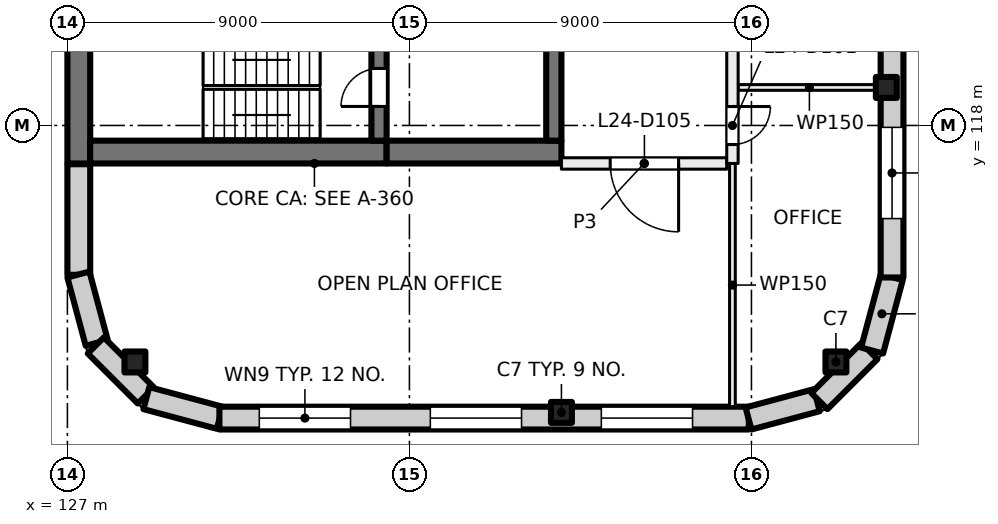
"""IFC4 building model, lengths in metres.
Left out: names, types, materials, properties, quantities, classifications, styles, units other than length and angle.
Written with IfcOpenShell. Run it as: python <this file> out.ifc"""

import sys

from ifc_helpers import new_model, si_unit, direction, frame, frame_2d, origin, origin_2d, place, context, subcontext, project, spatial, rectangle, extrude, element, fill, save


model = new_model("IFC4")
c1 = context("Model", 3, precision=1e-05, world=origin(), true_north=direction((0.0, 1.0)))
c2 = subcontext(c1, "Body", "Model", "MODEL_VIEW")
j1 = project(units=[si_unit("LENGTHUNIT", "METRE"), si_unit("PLANEANGLEUNIT", "RADIAN")], contexts=[c1])
p1 = place(None, origin())
s1 = spatial("IfcSite", under=j1, at=p1, CompositionType="ELEMENT")
p2 = place(p1, origin())
s2 = spatial("IfcBuilding", under=s1, at=p2, CompositionType="ELEMENT")
p3 = place(p2, frame((0.0, 0.0, 105.0)))
s3 = spatial("IfcBuildingStorey", under=s2, at=p3, CompositionType="ELEMENT", Elevation=105.0)
for number, where, z_axis, x_axis in (
    (1, (128.777, 111.777, 0.0), (0.0, 0.0, 1.0), (1.0, 0.0, 0.0)),
    (2, (148.55, 119.0, 0.0), (0.0, 0.0, 1.0), (1.0, 0.0, 0.0)),
    (3, (140.0, 110.45, 0.0), (0.0, 0.0, 1.0), (1.0, 0.0, 0.0)),
    (4, (147.223, 111.777, 0.0), (0.0, 0.0, 1.0), (1.0, 0.0, 0.0)),
):
    element("IfcColumn", number, at=place(p3, frame(where, z_axis=z_axis, x_axis=x_axis)), inside=s3, PredefinedType="COLUMN", context=c2, shape_type="SweptSolid", body=[
        extrude(rectangle(XDim=0.55, YDim=0.55, at=origin_2d()), origin(), (0.0, 0.0, 1.0), 4.0),
    ])
p4 = place(p3, frame((127.3, 117.0, 0.0), z_axis=(0.0, 0.0, 1.0), x_axis=(0.0, 1.0, 0.0)))
e5 = element("IfcWall", 5, at=p4, inside=s3, PredefinedType="SHEAR", context=c2, shape_type="SweptSolid", body=[
    extrude(rectangle(XDim=3.8, YDim=0.6, at=frame_2d((1.9, 0.0))), origin(), (0.0, 0.0, 1.0), 4.0),
])
p5 = place(p3, frame((127.6, 117.3, 0.0), z_axis=(0.0, 0.0, 1.0), x_axis=(1.0, 0.0, 0.0)))
e6 = element("IfcWall", 6, at=p5, inside=s3, PredefinedType="SHEAR", context=c2, shape_type="SweptSolid", body=[
    extrude(rectangle(XDim=7.8, YDim=0.6, at=frame_2d((3.9, 0.0))), origin(), (0.0, 0.0, 1.0), 4.0),
])
p6 = place(p3, frame((135.4, 117.3, 0.0), z_axis=(0.0, 0.0, 1.0), x_axis=(1.0, 0.0, 0.0)))
e7 = element("IfcWall", 7, at=p6, inside=s3, PredefinedType="SHEAR", context=c2, shape_type="SweptSolid", body=[
    extrude(rectangle(XDim=4.6, YDim=0.6, at=frame_2d((2.3, 0.0))), origin(), (0.0, 0.0, 1.0), 4.0),
])
p7 = place(p3, frame((135.2, 117.6, 0.0), z_axis=(0.0, 0.0, 1.0), x_axis=(0.0, 1.0, 0.0)))
e8 = element("IfcWall", 8, at=p7, inside=s3, PredefinedType="SHEAR", context=c2, shape_type="SweptSolid", body=[
    extrude(rectangle(XDim=2.8, YDim=0.4, at=frame_2d((1.4, 0.0))), origin(), (0.0, 0.0, 1.0), 4.0),
])
p8 = place(p7, frame((0.9, 0.0, 0.0)))
e9 = element("IfcOpeningElement", 9, at=p8, cuts=e8, PredefinedType="OPENING", context=c2, shape_type="SweptSolid", body=[
    extrude(rectangle(XDim=1.0, YDim=2.1, at=frame_2d((0.5, 1.05))), frame((0.0, 0.21, 0.0), z_axis=(0.0, -1.0, 0.0), x_axis=(1.0, 0.0, 0.0)), (0.0, 0.0, 1.0), 0.42),
])
p9 = place(p3, frame((139.8, 117.6, 0.0), z_axis=(0.0, 0.0, 1.0), x_axis=(0.0, 1.0, 0.0)))
e10 = element("IfcWall", 10, at=p9, inside=s3, PredefinedType="SHEAR", context=c2, shape_type="SweptSolid", body=[
    extrude(rectangle(XDim=8.6, YDim=0.4, at=frame_2d((4.3, 0.0))), origin(), (0.0, 0.0, 1.0), 4.0),
])
p10 = place(p3, frame((127.3, 114.07, 0.0), z_axis=(0.0, 0.0, 1.0), x_axis=(0.0, 1.0, 0.0)))
e11 = element("IfcWall", 11, at=p10, inside=s3, PredefinedType="SOLIDWALL", context=c2, shape_type="SweptSolid", body=[
    extrude(rectangle(XDim=2.91, YDim=0.6, at=frame_2d((1.455, 0.0))), origin(), (0.0, 0.0, 1.0), 3.625),
])
for number, where, z_axis, x_axis in (
    (12, (127.771, 112.281, 0.0), (0.0, 0.0, 1.0), (-0.259, 0.966, 0.0)),
    (13, (129.064, 110.896, 0.0), (0.0, 0.0, 1.0), (-0.707, 0.707, 0.0)),
):
    element("IfcWall", number, at=place(p3, frame(where, z_axis=z_axis, x_axis=x_axis)), inside=s3, PredefinedType="SOLIDWALL", context=c2, shape_type="SweptSolid", body=[
        extrude(rectangle(XDim=1.861, YDim=0.6, at=frame_2d((0.93, 0.0))), origin(), (0.0, 0.0, 1.0), 3.625),
    ])
p11 = place(p3, frame((131.01, 110.308, 0.0), z_axis=(0.0, 0.0, 1.0), x_axis=(-0.965920269068, 0.258839784042, 0.0)))
e14 = element("IfcWall", 14, at=p11, inside=s3, PredefinedType="SOLIDWALL", context=c2, shape_type="SweptSolid", body=[
    extrude(rectangle(XDim=2.0, YDim=0.6, at=frame_2d((1.0, 0.0))), origin(), (0.0, 0.0, 1.0), 3.625),
])
p12 = place(p3, frame((144.93, 110.3, 0.0), z_axis=(0.0, 0.0, 1.0), x_axis=(-1.0, 0.0, 0.0)))
e15 = element("IfcWall", 15, at=p12, inside=s3, PredefinedType="SOLIDWALL", context=c2, shape_type="SweptSolid", body=[
    extrude(rectangle(XDim=13.93, YDim=0.6, at=frame_2d((6.965, 0.0))), origin(), (0.0, 0.0, 1.0), 3.625),
])
p13 = place(p12, frame((1.48, 0.0, 0.9)))
e16 = element("IfcOpeningElement", 16, at=p13, cuts=e15, PredefinedType="OPENING", context=c2, shape_type="SweptSolid", body=[
    extrude(rectangle(XDim=2.4, YDim=2.4, at=frame_2d((1.2, 1.2))), frame((0.0, 0.31, 0.0), z_axis=(0.0, -1.0, 0.0), x_axis=(1.0, 0.0, 0.0)), (0.0, 0.0, 1.0), 0.62),
])
p14 = place(p12, frame((5.98, 0.0, 0.9)))
e17 = element("IfcOpeningElement", 17, at=p14, cuts=e15, PredefinedType="OPENING", context=c2, shape_type="SweptSolid", body=[
    extrude(rectangle(XDim=2.4, YDim=2.4, at=frame_2d((1.2, 1.2))), frame((0.0, 0.31, 0.0), z_axis=(0.0, -1.0, 0.0), x_axis=(1.0, 0.0, 0.0)), (0.0, 0.0, 1.0), 0.62),
])
p15 = place(p12, frame((10.48, 0.0, 0.9)))
e18 = element("IfcOpeningElement", 18, at=p15, cuts=e15, PredefinedType="OPENING", context=c2, shape_type="SweptSolid", body=[
    extrude(rectangle(XDim=2.4, YDim=2.4, at=frame_2d((1.2, 1.2))), frame((0.0, 0.31, 0.0), z_axis=(0.0, -1.0, 0.0), x_axis=(1.0, 0.0, 0.0)), (0.0, 0.0, 1.0), 0.62),
])
for number, where, z_axis, x_axis in (
    (19, (146.719, 110.771, 0.0), (0.0, 0.0, 1.0), (-0.966, -0.259, 0.0)),
    (20, (148.104, 112.064, 0.0), (0.0, 0.0, 1.0), (-0.707, -0.707, 0.0)),
):
    element("IfcWall", number, at=place(p3, frame(where, z_axis=z_axis, x_axis=x_axis)), inside=s3, PredefinedType="SOLIDWALL", context=c2, shape_type="SweptSolid", body=[
        extrude(rectangle(XDim=1.861, YDim=0.6, at=frame_2d((0.93, 0.0))), origin(), (0.0, 0.0, 1.0), 3.625),
    ])
p16 = place(p3, frame((148.692, 114.01, 0.0), z_axis=(0.0, 0.0, 1.0), x_axis=(-0.258839784042, -0.965920269068, 0.0)))
e21 = element("IfcWall", 21, at=p16, inside=s3, PredefinedType="SOLIDWALL", context=c2, shape_type="SweptSolid", body=[
    extrude(rectangle(XDim=2.0, YDim=0.6, at=frame_2d((1.0, 0.0))), origin(), (0.0, 0.0, 1.0), 3.625),
])
p17 = place(p3, frame((148.7, 141.93, 0.0), z_axis=(0.0, 0.0, 1.0), x_axis=(0.0, -1.0, 0.0)))
e22 = element("IfcWall", 22, at=p17, inside=s3, PredefinedType="SOLIDWALL", context=c2, shape_type="SweptSolid", body=[
    extrude(rectangle(XDim=27.93, YDim=0.6, at=frame_2d((13.965, 0.0))), origin(), (0.0, 0.0, 1.0), 3.625),
])
p18 = place(p17, frame((1.48, 0.0, 0.9)))
e23 = element("IfcOpeningElement", 23, at=p18, cuts=e22, PredefinedType="OPENING", context=c2, shape_type="SweptSolid", body=[
    extrude(rectangle(XDim=2.4, YDim=2.4, at=frame_2d((1.2, 1.2))), frame((0.0, 0.31, 0.0), z_axis=(0.0, -1.0, 0.0), x_axis=(1.0, 0.0, 0.0)), (0.0, 0.0, 1.0), 0.62),
])
p19 = place(p17, frame((5.98, 0.0, 0.9)))
e24 = element("IfcOpeningElement", 24, at=p19, cuts=e22, PredefinedType="OPENING", context=c2, shape_type="SweptSolid", body=[
    extrude(rectangle(XDim=2.4, YDim=2.4, at=frame_2d((1.2, 1.2))), frame((0.0, 0.31, 0.0), z_axis=(0.0, -1.0, 0.0), x_axis=(1.0, 0.0, 0.0)), (0.0, 0.0, 1.0), 0.62),
])
p20 = place(p17, frame((10.48, 0.0, 0.9)))
e25 = element("IfcOpeningElement", 25, at=p20, cuts=e22, PredefinedType="OPENING", context=c2, shape_type="SweptSolid", body=[
    extrude(rectangle(XDim=2.4, YDim=2.4, at=frame_2d((1.2, 1.2))), frame((0.0, 0.31, 0.0), z_axis=(0.0, -1.0, 0.0), x_axis=(1.0, 0.0, 0.0)), (0.0, 0.0, 1.0), 0.62),
])
p21 = place(p17, frame((14.98, 0.0, 0.9)))
e26 = element("IfcOpeningElement", 26, at=p21, cuts=e22, PredefinedType="OPENING", context=c2, shape_type="SweptSolid", body=[
    extrude(rectangle(XDim=2.4, YDim=2.4, at=frame_2d((1.2, 1.2))), frame((0.0, 0.31, 0.0), z_axis=(0.0, -1.0, 0.0), x_axis=(1.0, 0.0, 0.0)), (0.0, 0.0, 1.0), 0.62),
])
p22 = place(p17, frame((19.48, 0.0, 0.9)))
e27 = element("IfcOpeningElement", 27, at=p22, cuts=e22, PredefinedType="OPENING", context=c2, shape_type="SweptSolid", body=[
    extrude(rectangle(XDim=2.4, YDim=2.4, at=frame_2d((1.2, 1.2))), frame((0.0, 0.31, 0.0), z_axis=(0.0, -1.0, 0.0), x_axis=(1.0, 0.0, 0.0)), (0.0, 0.0, 1.0), 0.62),
])
p23 = place(p17, frame((23.98, 0.0, 0.9)))
e28 = element("IfcOpeningElement", 28, at=p23, cuts=e22, PredefinedType="OPENING", context=c2, shape_type="SweptSolid", body=[
    extrude(rectangle(XDim=2.4, YDim=2.4, at=frame_2d((1.2, 1.2))), frame((0.0, 0.31, 0.0), z_axis=(0.0, -1.0, 0.0), x_axis=(1.0, 0.0, 0.0)), (0.0, 0.0, 1.0), 0.62),
])
p24 = place(p3, frame((144.35, 117.0, 0.0), z_axis=(0.0, 0.0, 1.0), x_axis=(-1.0, 0.0, 0.0)))
e29 = element("IfcWall", 29, at=p24, inside=s3, PredefinedType="PARTITIONING", context=c2, shape_type="SweptSolid", body=[
    extrude(rectangle(XDim=4.35, YDim=0.3, at=frame_2d((2.175, 0.0))), origin(), (0.0, 0.0, 1.0), 3.625),
])
p25 = place(p24, frame((1.267, 0.0, 0.0)))
e30 = element("IfcOpeningElement", 30, at=p25, cuts=e29, PredefinedType="OPENING", context=c2, shape_type="SweptSolid", body=[
    extrude(rectangle(XDim=1.8, YDim=2.1, at=frame_2d((0.9, 1.05))), frame((0.0, 0.16, 0.0), z_axis=(0.0, -1.0, 0.0), x_axis=(1.0, 0.0, 0.0)), (0.0, 0.0, 1.0), 0.32),
])
p26 = place(p3, frame((144.5, 117.0, 0.0), z_axis=(0.0, 0.0, 1.0), x_axis=(0.0, -1.0, 0.0)))
e31 = element("IfcWall", 31, at=p26, inside=s3, PredefinedType="PARTITIONING", context=c2, shape_type="SweptSolid", body=[
    extrude(rectangle(XDim=6.4, YDim=0.15, at=frame_2d((3.2, 0.0))), origin(), (0.0, 0.0, 1.0), 3.625),
])
p27 = place(p3, frame((144.65, 119.0, 0.0), z_axis=(0.0, 0.0, 1.0), x_axis=(1.0, 0.0, 0.0)))
e32 = element("IfcWall", 32, at=p27, inside=s3, PredefinedType="PARTITIONING", context=c2, shape_type="SweptSolid", body=[
    extrude(rectangle(XDim=3.75, YDim=0.15, at=frame_2d((1.875, 0.0))), origin(), (0.0, 0.0, 1.0), 3.625),
])
p28 = place(p3, frame((144.5, 139.0, 0.0), z_axis=(0.0, 0.0, 1.0), x_axis=(0.0, -1.0, 0.0)))
e33 = element("IfcWall", 33, at=p28, inside=s3, PredefinedType="PARTITIONING", context=c2, shape_type="SweptSolid", body=[
    extrude(rectangle(XDim=22.0, YDim=0.3, at=frame_2d((11.0, 0.0))), origin(), (0.0, 0.0, 1.0), 3.625),
])
p29 = place(p28, frame((20.501, 0.0, 0.0)))
e34 = element("IfcOpeningElement", 34, at=p29, cuts=e33, PredefinedType="OPENING", context=c2, shape_type="SweptSolid", body=[
    extrude(rectangle(XDim=1.0, YDim=2.1, at=frame_2d((0.5, 1.05))), frame((0.0, 0.16, 0.0), z_axis=(0.0, -1.0, 0.0), x_axis=(1.0, 0.0, 0.0)), (0.0, 0.0, 1.0), 0.32),
])
p30 = place(p28, frame((15.0, 0.0, 0.0)))
e35 = element("IfcOpeningElement", 35, at=p30, cuts=e33, PredefinedType="OPENING", context=c2, shape_type="SweptSolid", body=[
    extrude(rectangle(XDim=1.0, YDim=2.1, at=frame_2d((0.5, 1.05))), frame((0.0, 0.16, 0.0), z_axis=(0.0, -1.0, 0.0), x_axis=(1.0, 0.0, 0.0)), (0.0, 0.0, 1.0), 0.32),
])
p31 = place(p28, frame((6.0, 0.0, 0.0)))
e36 = element("IfcOpeningElement", 36, at=p31, cuts=e33, PredefinedType="OPENING", context=c2, shape_type="SweptSolid", body=[
    extrude(rectangle(XDim=1.0, YDim=2.1, at=frame_2d((0.5, 1.05))), frame((0.0, 0.16, 0.0), z_axis=(0.0, -1.0, 0.0), x_axis=(1.0, 0.0, 0.0)), (0.0, 0.0, 1.0), 0.32),
])
p32 = place(p28, frame((0.499, 0.0, 0.0)))
e37 = element("IfcOpeningElement", 37, at=p32, cuts=e33, PredefinedType="OPENING", context=c2, shape_type="SweptSolid", body=[
    extrude(rectangle(XDim=1.0, YDim=2.1, at=frame_2d((0.5, 1.05))), frame((0.0, 0.16, 0.0), z_axis=(0.0, -1.0, 0.0), x_axis=(1.0, 0.0, 0.0)), (0.0, 0.0, 1.0), 0.32),
])
p33 = place(p13, origin())
e38 = element("IfcWindow", 38, at=p33, inside=s3, PartitioningType="SINGLE_PANEL", PredefinedType="WINDOW", context=c2, shape_type="SweptSolid", body=[
    extrude(rectangle(XDim=2.4, YDim=2.4, at=frame_2d((1.2, 1.2))), frame((0.0, 0.03, 0.0), z_axis=(0.0, -1.0, 0.0), x_axis=(1.0, 0.0, 0.0)), (0.0, 0.0, 1.0), 0.06),
])
fill(e16, e38)
p34 = place(p14, origin())
e39 = element("IfcWindow", 39, at=p34, inside=s3, PartitioningType="SINGLE_PANEL", PredefinedType="WINDOW", context=c2, shape_type="SweptSolid", body=[
    extrude(rectangle(XDim=2.4, YDim=2.4, at=frame_2d((1.2, 1.2))), frame((0.0, 0.03, 0.0), z_axis=(0.0, -1.0, 0.0), x_axis=(1.0, 0.0, 0.0)), (0.0, 0.0, 1.0), 0.06),
])
fill(e17, e39)
p35 = place(p15, origin())
e40 = element("IfcWindow", 40, at=p35, inside=s3, PartitioningType="SINGLE_PANEL", PredefinedType="WINDOW", context=c2, shape_type="SweptSolid", body=[
    extrude(rectangle(XDim=2.4, YDim=2.4, at=frame_2d((1.2, 1.2))), frame((0.0, 0.03, 0.0), z_axis=(0.0, -1.0, 0.0), x_axis=(1.0, 0.0, 0.0)), (0.0, 0.0, 1.0), 0.06),
])
fill(e18, e40)
p36 = place(p23, origin())
e41 = element("IfcWindow", 41, at=p36, inside=s3, PartitioningType="SINGLE_PANEL", PredefinedType="WINDOW", context=c2, shape_type="SweptSolid", body=[
    extrude(rectangle(XDim=2.4, YDim=2.4, at=frame_2d((1.2, 1.2))), frame((0.0, 0.03, 0.0), z_axis=(0.0, -1.0, 0.0), x_axis=(1.0, 0.0, 0.0)), (0.0, 0.0, 1.0), 0.06),
])
fill(e28, e41)
p37 = place(p8, origin())
e42 = element("IfcDoor", 42, at=p37, inside=s3, OperationType="SINGLE_SWING_RIGHT", PredefinedType="DOOR", context=c2, shape_type="SweptSolid", body=[
    extrude(rectangle(XDim=1.0, YDim=2.1, at=frame_2d((0.5, 1.05))), frame((0.0, 0.025, 0.0), z_axis=(0.0, -1.0, 0.0), x_axis=(1.0, 0.0, 0.0)), (0.0, 0.0, 1.0), 0.05),
])
fill(e9, e42)
p38 = place(p29, origin())
e43 = element("IfcDoor", 43, at=p38, inside=s3, OperationType="SINGLE_SWING_LEFT", PredefinedType="DOOR", context=c2, shape_type="SweptSolid", body=[
    extrude(rectangle(XDim=1.0, YDim=2.1, at=frame_2d((0.5, 1.05))), frame((0.0, 0.025, 0.0), z_axis=(0.0, -1.0, 0.0), x_axis=(1.0, 0.0, 0.0)), (0.0, 0.0, 1.0), 0.05),
])
fill(e34, e43)
p39 = place(p25, origin())
e44 = element("IfcDoor", 44, at=p39, inside=s3, OperationType="DOUBLE_DOOR_SINGLE_SWING", PredefinedType="DOOR", context=c2, shape_type="SweptSolid", body=[
    extrude(rectangle(XDim=1.8, YDim=2.1, at=frame_2d((0.9, 1.05))), frame((0.0, 0.025, 0.0), z_axis=(0.0, -1.0, 0.0), x_axis=(1.0, 0.0, 0.0)), (0.0, 0.0, 1.0), 0.05),
])
fill(e30, e44)
save(model, sys.argv[1])
